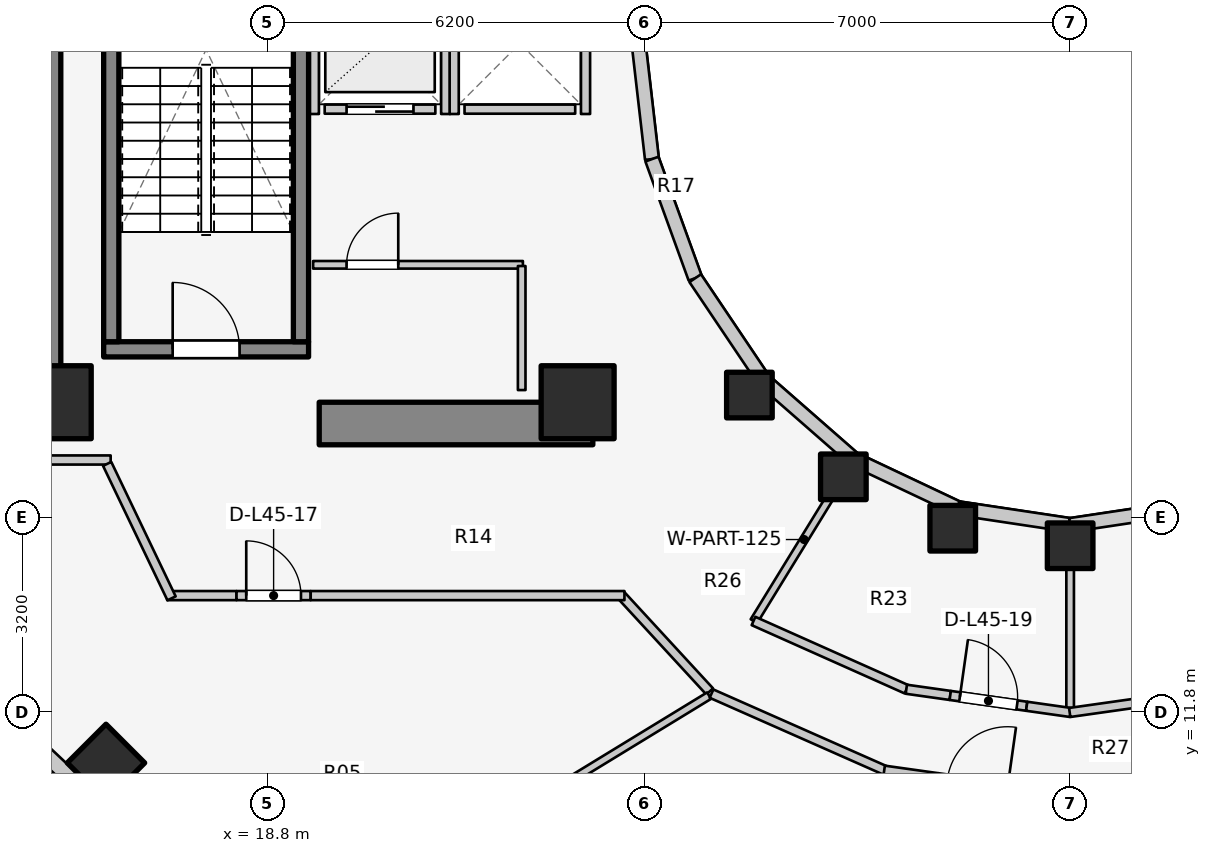
"""IFC4 building model, lengths in metres.
Left out: names, types, materials, properties, quantities, classifications, styles, units other than length and angle.
Written with IfcOpenShell. Run it as: python <this file> out.ifc"""

import sys

from ifc_helpers import new_model, si_unit, direction, frame, frame_2d, origin, origin_2d, place, context, subcontext, project, spatial, rectangle, extrude, element, fill, save


model = new_model("IFC4")
c1 = context("Model", 3, precision=1e-05, world=origin(), true_north=direction((0.0, 1.0)))
c2 = subcontext(c1, "Body", "Model", "MODEL_VIEW")
j1 = project(units=[si_unit("LENGTHUNIT", "METRE"), si_unit("PLANEANGLEUNIT", "RADIAN")], contexts=[c1])
p1 = place(None, origin())
s1 = spatial("IfcSite", under=j1, at=p1, CompositionType="ELEMENT")
p2 = place(p1, origin())
s2 = spatial("IfcBuilding", under=s1, at=p2, CompositionType="ELEMENT")
p3 = place(p2, frame((0.0, 0.0, 149.8)))
s3 = spatial("IfcBuildingStorey", under=s2, at=p3, CompositionType="ELEMENT", Elevation=149.8)
p4 = place(p3, frame((15.05, 17.05, 0.0), z_axis=(0.0, 0.0, 1.0), x_axis=(0.0, 1.0, 0.0)))
e1 = element("IfcWall", 1, at=p4, inside=s3, PredefinedType="SHEAR", context=c2, shape_type="SweptSolid", body=[
    extrude(rectangle(XDim=12.8, YDim=0.7, at=frame_2d((6.4, 0.0))), origin(), (0.0, 0.0, 1.0), 3.1),
])
p5 = place(p3, frame((19.65, 16.55, 0.0), z_axis=(0.0, 0.0, 1.0), x_axis=(1.0, 0.0, 0.0)))
e2 = element("IfcWall", 2, at=p5, inside=s3, PredefinedType="SHEAR", context=c2, shape_type="SweptSolid", body=[
    extrude(rectangle(XDim=4.5, YDim=0.7, at=frame_2d((2.25, 0.0))), origin(), (0.0, 0.0, 1.0), 3.1),
])
p6 = place(p3, frame((16.105, 17.77, 0.0), z_axis=(0.0, 0.0, 1.0), x_axis=(1.0, 0.0, 0.0)))
e3 = element("IfcWall", 3, at=p6, inside=s3, PredefinedType="SOLIDWALL", context=c2, shape_type="SweptSolid", body=[
    extrude(rectangle(XDim=3.37, YDim=0.25, at=frame_2d((1.685, 0.0))), origin(), (0.0, 0.0, 1.0), 3.1),
])
p7 = place(p6, frame((1.135, 0.0, 0.0)))
e4 = element("IfcOpeningElement", 4, at=p7, cuts=e3, PredefinedType="OPENING", context=c2, shape_type="SweptSolid", body=[
    extrude(rectangle(XDim=1.1, YDim=2.1, at=frame_2d((0.55, 1.05))), frame((0.0, 0.135, 0.0), z_axis=(0.0, -1.0, 0.0), x_axis=(1.0, 0.0, 0.0)), (0.0, 0.0, 1.0), 0.27),
])
for number, where, z_axis, x_axis in (
    (5, (16.23, 17.895, 0.0), (0.0, 0.0, 1.0), (0.0, 1.0, 0.0)),
    (6, (19.35, 17.895, 0.0), (0.0, 0.0, 1.0), (0.0, 1.0, 0.0)),
):
    element("IfcWall", number, at=place(p3, frame(where, z_axis=z_axis, x_axis=x_axis)), inside=s3, PredefinedType="SOLIDWALL", context=c2, shape_type="SweptSolid", body=[
        extrude(rectangle(XDim=7.81, YDim=0.25, at=frame_2d((3.905, 0.0))), origin(), (0.0, 0.0, 1.0), 3.1),
    ])
for number, where, z_axis, x_axis in (
    (7, (15.3, 16.9, 0.0), (0.0, 0.0, 1.0), (1.0, 0.0, 0.0)),
    (8, (23.9, 16.9, 0.0), (0.0, 0.0, 1.0), (1.0, 0.0, 0.0)),
):
    element("IfcColumn", number, at=place(p3, frame(where, z_axis=z_axis, x_axis=x_axis)), inside=s3, PredefinedType="COLUMN", context=c2, shape_type="SweptSolid", body=[
        extrude(rectangle(XDim=1.2, YDim=1.2, at=origin_2d()), origin(), (0.0, 0.0, 1.0), 3.1),
    ])
p8 = place(p3, frame((26.725, 17.018, 0.0), z_axis=(0.0, 0.0, 1.0), x_axis=(1.0, 0.0, 0.0)))
e9 = element("IfcColumn", 9, at=p8, inside=s3, PredefinedType="COLUMN", context=c2, shape_type="SweptSolid", body=[
    extrude(rectangle(XDim=0.75, YDim=0.75, at=origin_2d()), origin(), (0.0, 0.0, 1.0), 3.1),
])
p9 = place(p3, frame((16.143, 10.969, 0.0), z_axis=(0.0, 0.0, 1.0), x_axis=(-0.707106781187, -0.707106781187, 0.0)))
e10 = element("IfcColumn", 10, at=p9, inside=s3, PredefinedType="COLUMN", context=c2, shape_type="SweptSolid", body=[
    extrude(rectangle(XDim=0.9, YDim=0.9, at=origin_2d()), origin(), (0.0, 0.0, 1.0), 3.1),
])
for number, where, z_axis, x_axis in (
    (11, (28.27, 15.673, 0.0), (0.0, 0.0, 1.0), (1.0, 0.0, 0.0)),
    (12, (30.069, 14.828, 0.0), (0.0, 0.0, 1.0), (1.0, 0.0, 0.0)),
    (13, (32.0, 14.54, 0.0), (0.0, 0.0, 1.0), (1.0, 0.0, 0.0)),
):
    element("IfcColumn", number, at=place(p3, frame(where, z_axis=z_axis, x_axis=x_axis)), inside=s3, PredefinedType="COLUMN", context=c2, shape_type="SweptSolid", body=[
        extrude(rectangle(XDim=0.75, YDim=0.75, at=origin_2d()), origin(), (0.0, 0.0, 1.0), 3.1),
    ])
p10 = place(p3, frame((24.88, 23.0, 0.0), z_axis=(0.0, 0.0, 1.0), x_axis=(0.114711713601, -0.993398823617, 0.0)))
e14 = element("IfcWall", 14, at=p10, inside=s3, PredefinedType="STANDARD", context=c2, shape_type="SweptSolid", body=[
    extrude(rectangle(XDim=2.115, YDim=0.23, at=frame_2d((1.058, 0.0))), origin(), (0.0, 0.0, 1.0), 2.56),
])
p11 = place(p3, frame((25.123, 20.898, 0.0), z_axis=(0.0, 0.0, 1.0), x_axis=(0.341423187295, -0.93990968033, 0.0)))
e15 = element("IfcWall", 15, at=p11, inside=s3, PredefinedType="STANDARD", context=c2, shape_type="SweptSolid", body=[
    extrude(rectangle(XDim=2.084, YDim=0.23, at=frame_2d((1.042, 0.0))), origin(), (0.0, 0.0, 1.0), 2.56),
])
p12 = place(p3, frame((25.834, 18.94, 0.0), z_axis=(0.0, 0.0, 1.0), x_axis=(0.558197800898, -0.829707909492, 0.0)))
e16 = element("IfcWall", 16, at=p12, inside=s3, PredefinedType="STANDARD", context=c2, shape_type="SweptSolid", body=[
    extrude(rectangle(XDim=2.027, YDim=0.23, at=frame_2d((1.013, 0.0))), origin(), (0.0, 0.0, 1.0), 1.22),
])
p13 = place(p3, frame((26.965, 17.258, 0.0), z_axis=(0.0, 0.0, 1.0), x_axis=(0.752576694707, -0.658504607869, 0.0)))
e17 = element("IfcWall", 17, at=p13, inside=s3, PredefinedType="STANDARD", context=c2, shape_type="SweptSolid", body=[
    extrude(rectangle(XDim=1.959, YDim=0.23, at=frame_2d((0.98, 0.0))), origin(), (0.0, 0.0, 1.0), 1.22),
])
p14 = place(p3, frame((28.44, 15.968, 0.0), z_axis=(0.0, 0.0, 1.0), x_axis=(0.904179699603, -0.427152280606, 0.0)))
e18 = element("IfcWall", 18, at=p14, inside=s3, PredefinedType="STANDARD", context=c2, shape_type="SweptSolid", body=[
    extrude(rectangle(XDim=1.899, YDim=0.23, at=frame_2d((0.95, 0.0))), origin(), (0.0, 0.0, 1.0), 1.22),
])
for number, where, z_axis, x_axis in (
    (19, (30.157, 15.157, 0.0), (0.0, 0.0, 1.0), (0.989, -0.149, 0.0)),
    (20, (32.0, 14.88, 0.0), (0.0, 0.0, 1.0), (0.989, 0.149, 0.0)),
):
    element("IfcWall", number, at=place(p3, frame(where, z_axis=z_axis, x_axis=x_axis)), inside=s3, PredefinedType="STANDARD", context=c2, shape_type="SweptSolid", body=[
        extrude(rectangle(XDim=1.864, YDim=0.23, at=frame_2d((0.932, 0.0))), origin(), (0.0, 0.0, 1.0), 1.22),
    ])
p15 = place(p3, frame((12.381, 13.716, 0.0), z_axis=(0.0, 0.0, 1.0), x_axis=(0.727667301037, -0.68593024354, 0.0)))
e21 = element("IfcWall", 21, at=p15, inside=s3, PredefinedType="STANDARD", context=c2, shape_type="SweptSolid", body=[
    extrude(rectangle(XDim=4.604, YDim=0.26, at=frame_2d((2.302, 0.0))), origin(), (0.0, 0.0, 1.0), 1.22),
])
p16 = place(p15, frame((1.702, 0.0, 0.15)))
e22 = element("IfcOpeningElement", 22, at=p16, cuts=e21, PredefinedType="OPENING", context=c2, shape_type="SweptSolid", body=[
    extrude(rectangle(XDim=1.2, YDim=0.9, at=frame_2d((0.6, 0.45))), frame((0.0, 0.14, 0.0), z_axis=(0.0, -1.0, 0.0), x_axis=(1.0, 0.0, 0.0)), (0.0, 0.0, 1.0), 0.28),
])
p17 = place(p3, frame((19.74, 21.72, 0.0), z_axis=(0.0, 0.0, 1.0), x_axis=(1.0, 0.0, 0.0)))
e23 = element("IfcWall", 23, at=p17, inside=s3, PredefinedType="SOLIDWALL", context=c2, shape_type="SweptSolid", body=[
    extrude(rectangle(XDim=1.82, YDim=0.15, at=frame_2d((0.91, 0.0))), origin(), (0.0, 0.0, 1.0), 2.575),
])
p18 = place(p17, frame((0.36, 0.0, 0.0)))
e24 = element("IfcOpeningElement", 24, at=p18, cuts=e23, PredefinedType="OPENING", context=c2, shape_type="SweptSolid", body=[
    extrude(rectangle(XDim=1.1, YDim=2.1, at=frame_2d((0.55, 1.05))), frame((0.0, 0.085, 0.0), z_axis=(0.0, -1.0, 0.0), x_axis=(1.0, 0.0, 0.0)), (0.0, 0.0, 1.0), 0.17),
])
for number, where, z_axis, x_axis in (
    (25, (19.57, 21.64, 0.0), (0.0, 0.0, 1.0), (0.0, 1.0, 0.0)),
    (26, (21.73, 21.64, 0.0), (0.0, 0.0, 1.0), (0.0, 1.0, 0.0)),
):
    element("IfcWall", number, at=place(p3, frame(where, z_axis=z_axis, x_axis=x_axis)), inside=s3, PredefinedType="SOLIDWALL", context=c2, shape_type="SweptSolid", body=[
        extrude(rectangle(XDim=2.32, YDim=0.15, at=frame_2d((1.16, 0.0))), origin(), (0.0, 0.0, 1.0), 2.575),
    ])
p19 = place(p3, frame((22.04, 21.72, 0.0), z_axis=(0.0, 0.0, 1.0), x_axis=(1.0, 0.0, 0.0)))
e27 = element("IfcWall", 27, at=p19, inside=s3, PredefinedType="SOLIDWALL", context=c2, shape_type="SweptSolid", body=[
    extrude(rectangle(XDim=1.82, YDim=0.15, at=frame_2d((0.91, 0.0))), origin(), (0.0, 0.0, 1.0), 2.12),
])
p20 = place(p3, frame((21.87, 21.64, 0.0), z_axis=(0.0, 0.0, 1.0), x_axis=(0.0, 1.0, 0.0)))
e28 = element("IfcWall", 28, at=p20, inside=s3, PredefinedType="SOLIDWALL", context=c2, shape_type="SweptSolid", body=[
    extrude(rectangle(XDim=2.32, YDim=0.15, at=frame_2d((1.16, 0.0))), origin(), (0.0, 0.0, 1.0), 2.575),
])
p21 = place(p3, frame((24.03, 21.64, 0.0), z_axis=(0.0, 0.0, 1.0), x_axis=(0.0, 1.0, 0.0)))
e29 = element("IfcWall", 29, at=p21, inside=s3, PredefinedType="SOLIDWALL", context=c2, shape_type="SweptSolid", body=[
    extrude(rectangle(XDim=2.32, YDim=0.15, at=frame_2d((1.16, 0.0))), origin(), (0.0, 0.0, 1.0), 2.12),
])
p22 = place(p3, frame((19.55, 19.16, 0.0), z_axis=(0.0, 0.0, 1.0), x_axis=(1.0, 0.0, 0.0)))
e30 = element("IfcWall", 30, at=p22, inside=s3, PredefinedType="PARTITIONING", context=c2, shape_type="SweptSolid", body=[
    extrude(rectangle(XDim=3.45, YDim=0.125, at=frame_2d((1.725, 0.0))), origin(), (0.0, 0.0, 1.0), 2.12),
])
p23 = place(p22, frame((0.55, 0.0, 0.0)))
e31 = element("IfcOpeningElement", 31, at=p23, cuts=e30, PredefinedType="OPENING", context=c2, shape_type="SweptSolid", body=[
    extrude(rectangle(XDim=0.85, YDim=2.05, at=frame_2d((0.425, 1.025))), frame((0.0, 0.073, 0.0), z_axis=(0.0, -1.0, 0.0), x_axis=(1.0, 0.0, 0.0)), (0.0, 0.0, 1.0), 0.145),
])
p24 = place(p3, frame((22.98, 17.1, 0.0), z_axis=(0.0, 0.0, 1.0), x_axis=(0.0, 1.0, 0.0)))
e32 = element("IfcWall", 32, at=p24, inside=s3, PredefinedType="PARTITIONING", context=c2, shape_type="SweptSolid", body=[
    extrude(rectangle(XDim=2.04, YDim=0.125, at=frame_2d((1.02, 0.0))), origin(), (0.0, 0.0, 1.0), 2.575),
])
p25 = place(p3, frame((10.96, 15.95, 0.0), z_axis=(0.0, 0.0, 1.0), x_axis=(1.0, 0.0, 0.0)))
e33 = element("IfcWall", 33, at=p25, inside=s3, PredefinedType="PARTITIONING", context=c2, shape_type="SweptSolid", body=[
    extrude(rectangle(XDim=5.26, YDim=0.15, at=frame_2d((2.63, 0.0))), origin(), (0.0, 0.0, 1.0), 1.22),
])
p26 = place(p3, frame((26.072, 12.144, 0.0), z_axis=(0.0, 0.0, 1.0), x_axis=(-0.677579737957, 0.735449317567, 0.0)))
e34 = element("IfcWall", 34, at=p26, inside=s3, PredefinedType="PARTITIONING", context=c2, shape_type="SweptSolid", body=[
    extrude(rectangle(XDim=2.173, YDim=0.15, at=frame_2d((1.086, 0.0))), origin(), (0.0, 0.0, 1.0), 1.22),
])
p27 = place(p3, frame((17.15, 13.72, 0.0), z_axis=(0.0, 0.0, 1.0), x_axis=(1.0, 0.0, 0.0)))
e35 = element("IfcWall", 35, at=p27, inside=s3, PredefinedType="PARTITIONING", context=c2, shape_type="SweptSolid", body=[
    extrude(rectangle(XDim=1.14, YDim=0.15, at=frame_2d((0.57, 0.0))), origin(), (0.0, 0.0, 1.0), 2.575),
])
p28 = place(p3, frame((18.29, 13.72, 0.0), z_axis=(0.0, 0.0, 1.0), x_axis=(1.0, 0.0, 0.0)))
e36 = element("IfcWall", 36, at=p28, inside=s3, PredefinedType="PARTITIONING", context=c2, shape_type="SweptSolid", body=[
    extrude(rectangle(XDim=1.22, YDim=0.15, at=frame_2d((0.61, 0.0))), origin(), (0.0, 0.0, 1.0), 2.575),
])
p29 = place(p28, frame((0.16, 0.0, 0.0)))
e37 = element("IfcOpeningElement", 37, at=p29, cuts=e36, PredefinedType="OPENING", context=c2, shape_type="SweptSolid", body=[
    extrude(rectangle(XDim=0.9, YDim=2.1, at=frame_2d((0.45, 1.05))), frame((0.0, 0.085, 0.0), z_axis=(0.0, -1.0, 0.0), x_axis=(1.0, 0.0, 0.0)), (0.0, 0.0, 1.0), 0.17),
])
p30 = place(p3, frame((19.51, 13.72, 0.0), z_axis=(0.0, 0.0, 1.0), x_axis=(1.0, 0.0, 0.0)))
e38 = element("IfcWall", 38, at=p30, inside=s3, PredefinedType="PARTITIONING", context=c2, shape_type="SweptSolid", body=[
    extrude(rectangle(XDim=5.16, YDim=0.15, at=frame_2d((2.58, 0.0))), origin(), (0.0, 0.0, 1.0), 1.22),
])
p31 = place(p3, frame((17.222, 13.675, 0.0), z_axis=(0.0, 0.0, 1.0), x_axis=(-0.431973389813, 0.901886351207, 0.0)))
e39 = element("IfcWall", 39, at=p31, inside=s3, PredefinedType="PARTITIONING", context=c2, shape_type="SweptSolid", body=[
    extrude(rectangle(XDim=2.452, YDim=0.15, at=frame_2d((1.226, 0.0))), origin(), (0.0, 0.0, 1.0), 2.575),
])
p32 = place(p3, frame((28.45, 15.985, 0.0), z_axis=(0.0, 0.0, 1.0), x_axis=(-0.523587550846, -0.851971875474, 0.0)))
e40 = element("IfcWall", 40, at=p32, inside=s3, PredefinedType="PARTITIONING", context=c2, shape_type="SweptSolid", body=[
    extrude(rectangle(XDim=3.153, YDim=0.125, at=frame_2d((1.577, 0.0))), origin(), (0.0, 0.0, 1.0), 1.22),
])
p33 = place(p3, frame((32.0, 14.9, 0.0), z_axis=(0.0, 0.0, 1.0), x_axis=(0.0, -1.0, 0.0)))
e41 = element("IfcWall", 41, at=p33, inside=s3, PredefinedType="PARTITIONING", context=c2, shape_type="SweptSolid", body=[
    extrude(rectangle(XDim=3.102, YDim=0.125, at=frame_2d((1.551, 0.0))), origin(), (0.0, 0.0, 1.0), 1.22),
])
p34 = place(p3, frame((26.793, 13.303, 0.0), z_axis=(0.0, 0.0, 1.0), x_axis=(0.913145536541, -0.407633694749, 0.0)))
e42 = element("IfcWall", 42, at=p34, inside=s3, PredefinedType="PARTITIONING", context=c2, shape_type="SweptSolid", body=[
    extrude(rectangle(XDim=2.756, YDim=0.15, at=frame_2d((1.378, 0.0))), origin(), (0.0, 0.0, 1.0), 1.22),
])
p35 = place(p3, frame((29.306, 12.18, 0.0), z_axis=(0.0, 0.0, 1.0), x_axis=(0.990156034925, -0.139967948123, 0.0)))
e43 = element("IfcWall", 43, at=p35, inside=s3, PredefinedType="PARTITIONING", context=c2, shape_type="SweptSolid", body=[
    extrude(rectangle(XDim=0.729, YDim=0.15, at=frame_2d((0.365, 0.0))), origin(), (0.0, 0.0, 1.0), 2.575),
])
p36 = place(p3, frame((30.028, 12.078, 0.0), z_axis=(0.0, 0.0, 1.0), x_axis=(0.990133183593, -0.140129507055, 0.0)))
e44 = element("IfcWall", 44, at=p36, inside=s3, PredefinedType="PARTITIONING", context=c2, shape_type="SweptSolid", body=[
    extrude(rectangle(XDim=1.27, YDim=0.15, at=frame_2d((0.635, 0.0))), origin(), (0.0, 0.0, 1.0), 2.575),
])
p37 = place(p36, frame((0.16, 0.0, 0.0)))
e45 = element("IfcOpeningElement", 45, at=p37, cuts=e44, PredefinedType="OPENING", context=c2, shape_type="SweptSolid", body=[
    extrude(rectangle(XDim=0.95, YDim=2.1, at=frame_2d((0.475, 1.05))), frame((0.0, 0.085, 0.0), z_axis=(0.0, -1.0, 0.0), x_axis=(1.0, 0.0, 0.0)), (0.0, 0.0, 1.0), 0.17),
])
p38 = place(p3, frame((31.285, 11.9, 0.0), z_axis=(0.0, 0.0, 1.0), x_axis=(0.990156034925, -0.139967948123, 0.0)))
e46 = element("IfcWall", 46, at=p38, inside=s3, PredefinedType="PARTITIONING", context=c2, shape_type="SweptSolid", body=[
    extrude(rectangle(XDim=0.729, YDim=0.15, at=frame_2d((0.365, 0.0))), origin(), (0.0, 0.0, 1.0), 1.22),
])
p39 = place(p3, frame((31.993, 11.798, 0.0), z_axis=(0.0, 0.0, 1.0), x_axis=(0.990145400278, 0.140043158738, 0.0)))
e47 = element("IfcWall", 47, at=p39, inside=s3, PredefinedType="PARTITIONING", context=c2, shape_type="SweptSolid", body=[
    extrude(rectangle(XDim=2.728, YDim=0.15, at=frame_2d((1.364, 0.0))), origin(), (0.0, 0.0, 1.0), 1.22),
])
p40 = place(p3, frame((26.062, 12.075, 0.0), z_axis=(0.0, 0.0, 1.0), x_axis=(-0.853440334679, -0.521190555501, 0.0)))
e48 = element("IfcWall", 48, at=p40, inside=s3, PredefinedType="PARTITIONING", context=c2, shape_type="SweptSolid", body=[
    extrude(rectangle(XDim=6.966, YDim=0.125, at=frame_2d((3.483, 0.0))), origin(), (0.0, 0.0, 1.0), 1.22),
])
p41 = place(p3, frame((26.102, 12.108, 0.0), z_axis=(0.0, 0.0, 1.0), x_axis=(0.914519212393, -0.40454247016, 0.0)))
e49 = element("IfcWall", 49, at=p41, inside=s3, PredefinedType="PARTITIONING", context=c2, shape_type="SweptSolid", body=[
    extrude(rectangle(XDim=3.124, YDim=0.15, at=frame_2d((1.562, 0.0))), origin(), (0.0, 0.0, 1.0), 1.22),
])
p42 = place(p3, frame((28.943, 10.849, 0.0), z_axis=(0.0, 0.0, 1.0), x_axis=(0.990238800444, -0.139381197064, 0.0)))
e50 = element("IfcWall", 50, at=p42, inside=s3, PredefinedType="PARTITIONING", context=c2, shape_type="SweptSolid", body=[
    extrude(rectangle(XDim=0.888, YDim=0.15, at=frame_2d((0.444, 0.0))), origin(), (0.0, 0.0, 1.0), 2.575),
])
p43 = place(p3, frame((29.822, 10.725, 0.0), z_axis=(0.0, 0.0, 1.0), x_axis=(0.990250599082, -0.139297347489, 0.0)))
e51 = element("IfcWall", 51, at=p43, inside=s3, PredefinedType="PARTITIONING", context=c2, shape_type="SweptSolid", body=[
    extrude(rectangle(XDim=1.32, YDim=0.15, at=frame_2d((0.66, 0.0))), origin(), (0.0, 0.0, 1.0), 2.575),
])
p44 = place(p43, frame((0.16, 0.0, 0.0)))
e52 = element("IfcOpeningElement", 52, at=p44, cuts=e51, PredefinedType="OPENING", context=c2, shape_type="SweptSolid", body=[
    extrude(rectangle(XDim=1.0, YDim=2.1, at=frame_2d((0.5, 1.05))), frame((0.0, 0.085, 0.0), z_axis=(0.0, -1.0, 0.0), x_axis=(1.0, 0.0, 0.0)), (0.0, 0.0, 1.0), 0.17),
])
p45 = place(p3, frame((31.992, 10.418, 0.0), z_axis=(0.0, 0.0, 1.0), x_axis=(0.990254709652, 0.13926812274, 0.0)))
e53 = element("IfcWall", 53, at=p45, inside=s3, PredefinedType="PARTITIONING", context=c2, shape_type="SweptSolid", body=[
    extrude(rectangle(XDim=3.096, YDim=0.15, at=frame_2d((1.548, 0.0))), origin(), (0.0, 0.0, 1.0), 1.22),
])
p46 = place(p7, origin())
e54 = element("IfcDoor", 54, at=p46, inside=s3, OperationType="SINGLE_SWING_LEFT", PredefinedType="DOOR", context=c2, shape_type="SweptSolid", body=[
    extrude(rectangle(XDim=1.1, YDim=2.1, at=frame_2d((0.55, 1.05))), frame((0.0, 0.025, 0.0), z_axis=(0.0, -1.0, 0.0), x_axis=(1.0, 0.0, 0.0)), (0.0, 0.0, 1.0), 0.05),
])
fill(e4, e54)
p47 = place(p18, origin())
e55 = element("IfcDoor", 55, at=p47, inside=s3, OperationType="DOUBLE_DOOR_SLIDING", PredefinedType="DOOR", context=c2, shape_type="SweptSolid", body=[
    extrude(rectangle(XDim=1.1, YDim=2.1, at=frame_2d((0.55, 1.05))), frame((0.0, 0.025, 0.0), z_axis=(0.0, -1.0, 0.0), x_axis=(1.0, 0.0, 0.0)), (0.0, 0.0, 1.0), 0.05),
])
fill(e24, e55)
p48 = place(p23, origin())
e56 = element("IfcDoor", 56, at=p48, inside=s3, OperationType="SINGLE_SWING_RIGHT", PredefinedType="DOOR", context=c2, shape_type="SweptSolid", body=[
    extrude(rectangle(XDim=0.85, YDim=2.05, at=frame_2d((0.425, 1.025))), frame((0.0, 0.025, 0.0), z_axis=(0.0, -1.0, 0.0), x_axis=(1.0, 0.0, 0.0)), (0.0, 0.0, 1.0), 0.05),
])
fill(e31, e56)
p49 = place(p29, origin())
e57 = element("IfcDoor", 57, at=p49, inside=s3, OperationType="SINGLE_SWING_LEFT", PredefinedType="DOOR", context=c2, shape_type="SweptSolid", body=[
    extrude(rectangle(XDim=0.9, YDim=2.1, at=frame_2d((0.45, 1.05))), frame((0.0, 0.025, 0.0), z_axis=(0.0, -1.0, 0.0), x_axis=(1.0, 0.0, 0.0)), (0.0, 0.0, 1.0), 0.05),
])
fill(e37, e57)
p50 = place(p37, origin())
e58 = element("IfcDoor", 58, at=p50, inside=s3, OperationType="SINGLE_SWING_LEFT", PredefinedType="DOOR", context=c2, shape_type="SweptSolid", body=[
    extrude(rectangle(XDim=0.95, YDim=2.1, at=frame_2d((0.475, 1.05))), frame((0.0, 0.025, 0.0), z_axis=(0.0, -1.0, 0.0), x_axis=(1.0, 0.0, 0.0)), (0.0, 0.0, 1.0), 0.05),
])
fill(e45, e58)
save(model, sys.argv[1])
